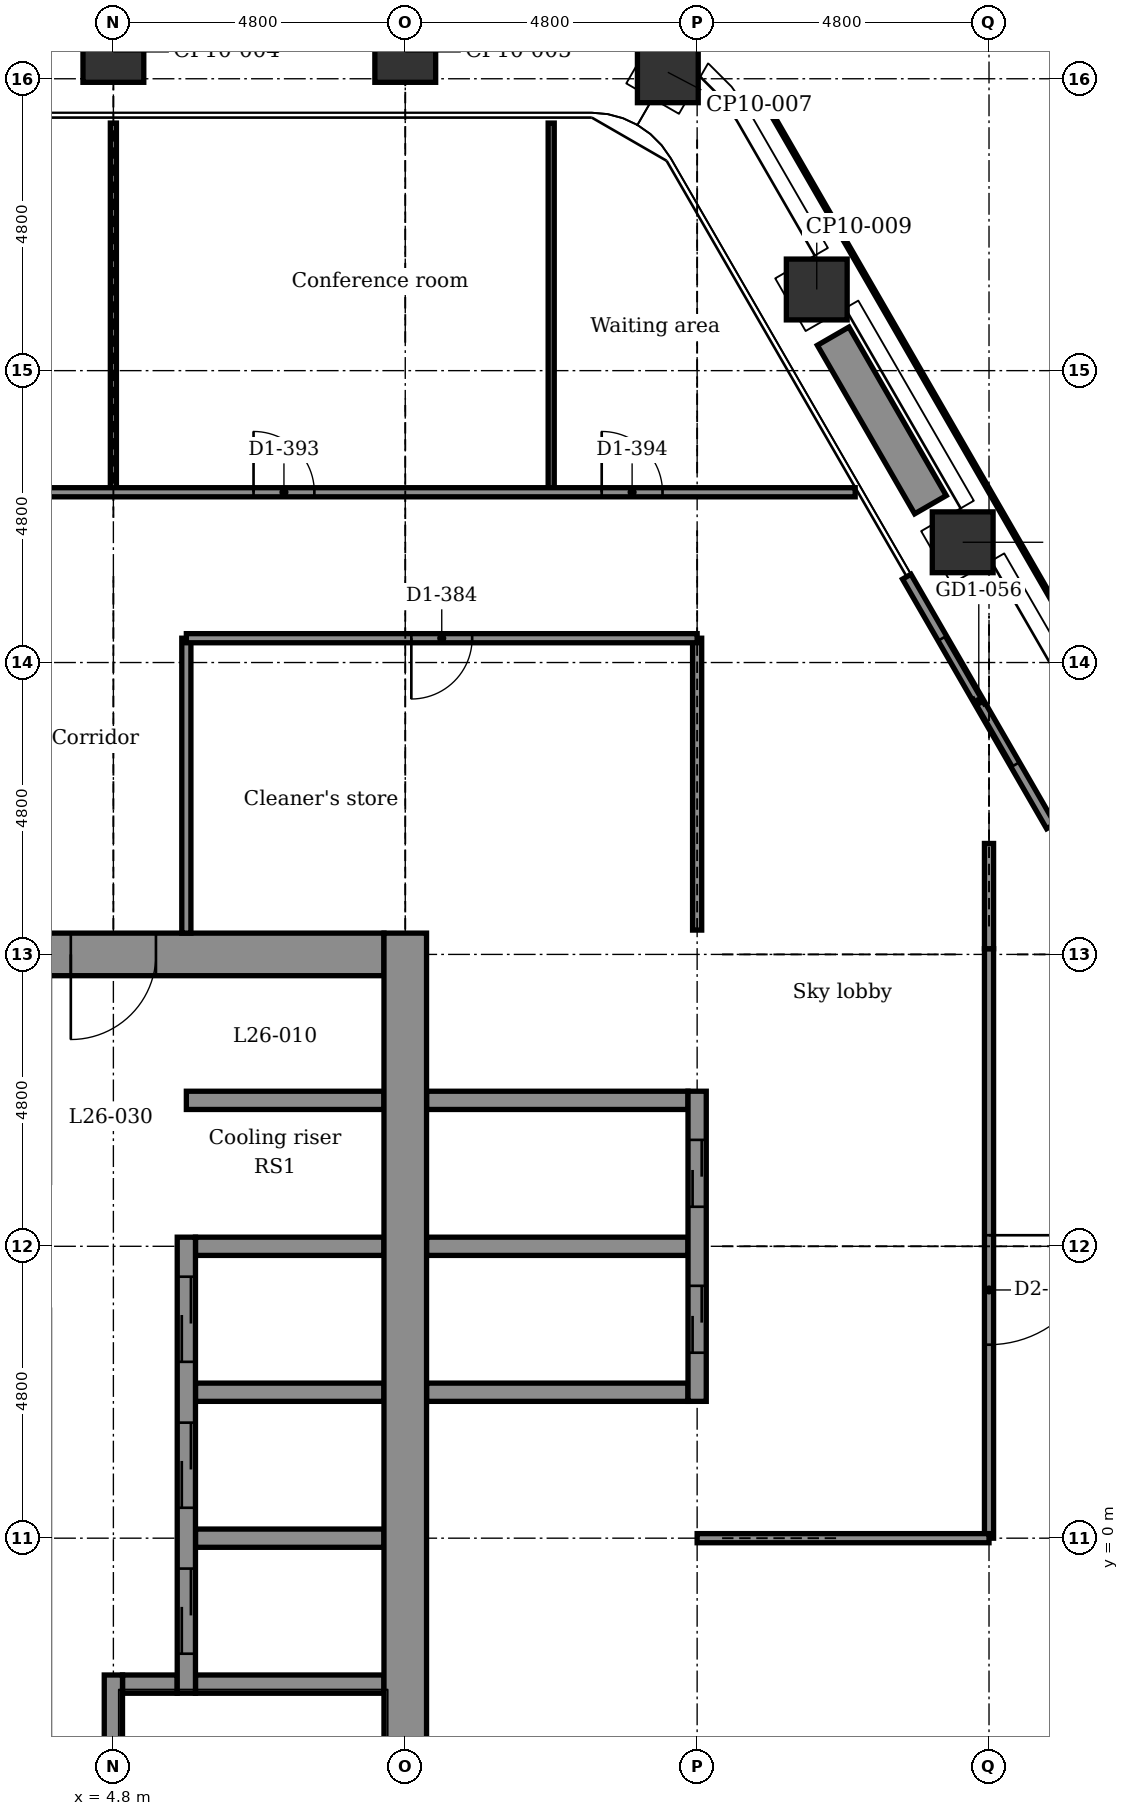
"""IFC4 building model, lengths in metres.
Left out: names, types, materials, properties, quantities, classifications, styles, units other than length and angle.
Written with IfcOpenShell. Run it as: python <this file> out.ifc"""

import sys

from ifc_helpers import new_model, si_unit, direction, frame, frame_2d, origin, origin_2d, place, context, subcontext, project, spatial, rectangle, extrude, element, fill, save


model = new_model("IFC4")
c1 = context("Model", 3, precision=1e-05, world=origin(), true_north=direction((0.0, 1.0)))
c2 = subcontext(c1, "Body", "Model", "MODEL_VIEW")
j1 = project(units=[si_unit("LENGTHUNIT", "METRE"), si_unit("PLANEANGLEUNIT", "RADIAN")], contexts=[c1])
p1 = place(None, origin())
s1 = spatial("IfcSite", under=j1, at=p1, CompositionType="ELEMENT")
p2 = place(p1, origin())
s2 = spatial("IfcBuilding", under=s1, at=p2, CompositionType="ELEMENT")
p3 = place(p2, frame((0.0, 0.0, 133.4)))
s3 = spatial("IfcBuildingStorey", under=s2, at=p3, CompositionType="ELEMENT", Elevation=133.4)
for number, where, z_axis, x_axis in (
    (1, (4.8, 24.442, -0.15), (0.0, 0.0, 1.0), (1.0, 0.0, 0.0)),
    (2, (9.6, 24.442, -0.15), (0.0, 0.0, 1.0), (1.0, 0.0, 0.0)),
    (3, (13.918, 24.107, -0.15), (0.0, 0.0, 1.0), (0.5, 0.866, 0.0)),
    (4, (16.367, 20.535, -0.15), (0.0, 0.0, 1.0), (0.866, 0.5, 0.0)),
    (5, (18.767, 16.378, -0.15), (0.0, 0.0, 1.0), (0.866, 0.5, 0.0)),
):
    element("IfcColumn", number, at=place(p3, frame(where, z_axis=z_axis, x_axis=x_axis)), inside=s3, PredefinedType="COLUMN", context=c2, shape_type="SweptSolid", body=[
        extrude(rectangle(XDim=1.0, YDim=1.0, at=origin_2d()), origin(), (0.0, 0.0, 1.0), 5.4),
    ])
p4 = place(p3, frame((4.95, -2.4, -0.15), z_axis=(0.0, 0.0, 1.0), x_axis=(1.0, 0.0, 0.0)))
e6 = element("IfcWall", 6, at=p4, inside=s3, PredefinedType="STANDARD", context=c2, shape_type="SweptSolid", body=[
    extrude(rectangle(XDim=0.9, YDim=0.3, at=frame_2d((0.45, 0.0))), origin(), (0.0, 0.0, 1.0), 5.4),
])
for number, where, z_axis, x_axis in (
    (7, (6.15, -2.4, -0.15), (0.0, 0.0, 1.0), (1.0, 0.0, 0.0)),
    (8, (6.15, 0.0, -0.15), (0.0, 0.0, 1.0), (1.0, 0.0, 0.0)),
    (9, (6.15, 2.4, -0.15), (0.0, 0.0, 1.0), (1.0, 0.0, 0.0)),
):
    element("IfcWall", number, at=place(p3, frame(where, z_axis=z_axis, x_axis=x_axis)), inside=s3, PredefinedType="STANDARD", context=c2, shape_type="SweptSolid", body=[
        extrude(rectangle(XDim=3.1, YDim=0.3, at=frame_2d((1.55, 0.0))), origin(), (0.0, 0.0, 1.0), 5.4),
    ])
p5 = place(p3, frame((9.95, 2.4, -0.15), z_axis=(0.0, 0.0, 1.0), x_axis=(1.0, 0.0, 0.0)))
e10 = element("IfcWall", 10, at=p5, inside=s3, PredefinedType="STANDARD", context=c2, shape_type="SweptSolid", body=[
    extrude(rectangle(XDim=4.3, YDim=0.3, at=frame_2d((2.15, 0.0))), origin(), (0.0, 0.0, 1.0), 4.55),
])
p6 = place(p3, frame((6.15, 4.8, -0.15), z_axis=(0.0, 0.0, 1.0), x_axis=(1.0, 0.0, 0.0)))
e11 = element("IfcWall", 11, at=p6, inside=s3, PredefinedType="STANDARD", context=c2, shape_type="SweptSolid", body=[
    extrude(rectangle(XDim=3.1, YDim=0.3, at=frame_2d((1.55, 0.0))), origin(), (0.0, 0.0, 1.0), 5.4),
])
p7 = place(p3, frame((9.95, 4.8, -0.15), z_axis=(0.0, 0.0, 1.0), x_axis=(1.0, 0.0, 0.0)))
e12 = element("IfcWall", 12, at=p7, inside=s3, PredefinedType="STANDARD", context=c2, shape_type="SweptSolid", body=[
    extrude(rectangle(XDim=4.3, YDim=0.3, at=frame_2d((2.15, 0.0))), origin(), (0.0, 0.0, 1.0), 4.55),
])
p8 = place(p3, frame((6.0, 7.2, -0.15), z_axis=(0.0, 0.0, 1.0), x_axis=(1.0, 0.0, 0.0)))
e13 = element("IfcWall", 13, at=p8, inside=s3, PredefinedType="STANDARD", context=c2, shape_type="SweptSolid", body=[
    extrude(rectangle(XDim=3.25, YDim=0.3, at=frame_2d((1.625, 0.0))), origin(), (0.0, 0.0, 1.0), 5.4),
])
p9 = place(p3, frame((9.95, 7.2, -0.15), z_axis=(0.0, 0.0, 1.0), x_axis=(1.0, 0.0, 0.0)))
e14 = element("IfcWall", 14, at=p9, inside=s3, PredefinedType="STANDARD", context=c2, shape_type="SweptSolid", body=[
    extrude(rectangle(XDim=4.3, YDim=0.3, at=frame_2d((2.15, 0.0))), origin(), (0.0, 0.0, 1.0), 4.55),
])
p10 = place(p3, frame((-5.25, 9.6, -0.15), z_axis=(0.0, 0.0, 1.0), x_axis=(1.0, 0.0, 0.0)))
e15 = element("IfcWall", 15, at=p10, inside=s3, PredefinedType="SHEAR", context=c2, shape_type="SweptSolid", body=[
    extrude(rectangle(XDim=14.5, YDim=0.7, at=frame_2d((7.25, 0.0))), origin(), (0.0, 0.0, 1.0), 5.4),
])
p11 = place(p10, frame((9.35, 0.0, 0.15)))
e16 = element("IfcOpeningElement", 16, at=p11, cuts=e15, PredefinedType="OPENING", context=c2, shape_type="SweptSolid", body=[
    extrude(rectangle(XDim=1.4, YDim=2.1, at=frame_2d((0.7, 1.05))), frame((0.0, 0.36, 0.0), z_axis=(0.0, -1.0, 0.0), x_axis=(1.0, 0.0, 0.0)), (0.0, 0.0, 1.0), 0.72),
])
p12 = place(p3, frame((4.8, -9.25, -0.15), z_axis=(0.0, 0.0, 1.0), x_axis=(0.0, 1.0, 0.0)))
e17 = element("IfcWall", 17, at=p12, inside=s3, PredefinedType="STANDARD", context=c2, shape_type="SweptSolid", body=[
    extrude(rectangle(XDim=7.0, YDim=0.3, at=frame_2d((3.5, 0.0))), origin(), (0.0, 0.0, 1.0), 5.4),
])
p13 = place(p12, frame((3.8, 0.0, 0.15)))
e18 = element("IfcOpeningElement", 18, at=p13, cuts=e17, PredefinedType="OPENING", context=c2, shape_type="SweptSolid", body=[
    extrude(rectangle(XDim=1.2, YDim=2.1, at=frame_2d((0.6, 1.05))), frame((0.0, 0.16, 0.0), z_axis=(0.0, -1.0, 0.0), x_axis=(1.0, 0.0, 0.0)), (0.0, 0.0, 1.0), 0.32),
])
p14 = place(p3, frame((6.0, -2.55, -0.15), z_axis=(0.0, 0.0, 1.0), x_axis=(0.0, 1.0, 0.0)))
e19 = element("IfcWall", 19, at=p14, inside=s3, PredefinedType="STANDARD", context=c2, shape_type="SweptSolid", body=[
    extrude(rectangle(XDim=7.5, YDim=0.3, at=frame_2d((3.75, 0.0))), origin(), (0.0, 0.0, 1.0), 5.4),
])
p15 = place(p14, frame((0.65, 0.0, 0.15)))
e20 = element("IfcOpeningElement", 20, at=p15, cuts=e19, PredefinedType="OPENING", context=c2, shape_type="SweptSolid", body=[
    extrude(rectangle(XDim=1.4, YDim=2.1, at=frame_2d((0.7, 1.05))), frame((0.0, 0.16, 0.0), z_axis=(0.0, -1.0, 0.0), x_axis=(1.0, 0.0, 0.0)), (0.0, 0.0, 1.0), 0.32),
])
p16 = place(p14, frame((3.05, 0.0, 0.15)))
e21 = element("IfcOpeningElement", 21, at=p16, cuts=e19, PredefinedType="OPENING", context=c2, shape_type="SweptSolid", body=[
    extrude(rectangle(XDim=1.4, YDim=2.1, at=frame_2d((0.7, 1.05))), frame((0.0, 0.16, 0.0), z_axis=(0.0, -1.0, 0.0), x_axis=(1.0, 0.0, 0.0)), (0.0, 0.0, 1.0), 0.32),
])
p17 = place(p14, frame((5.45, 0.0, 0.15)))
e22 = element("IfcOpeningElement", 22, at=p17, cuts=e19, PredefinedType="OPENING", context=c2, shape_type="SweptSolid", body=[
    extrude(rectangle(XDim=1.4, YDim=2.1, at=frame_2d((0.7, 1.05))), frame((0.0, 0.16, 0.0), z_axis=(0.0, -1.0, 0.0), x_axis=(1.0, 0.0, 0.0)), (0.0, 0.0, 1.0), 0.32),
])
p18 = place(p3, frame((9.6, -10.15, -0.15), z_axis=(0.0, 0.0, 1.0), x_axis=(0.0, 1.0, 0.0)))
e23 = element("IfcWall", 23, at=p18, inside=s3, PredefinedType="SHEAR", context=c2, shape_type="SweptSolid", body=[
    extrude(rectangle(XDim=20.1, YDim=0.7, at=frame_2d((10.05, 0.0))), origin(), (0.0, 0.0, 1.0), 5.4),
])
p19 = place(p3, frame((14.4, 2.25, -0.15), z_axis=(0.0, 0.0, 1.0), x_axis=(0.0, 1.0, 0.0)))
e24 = element("IfcWall", 24, at=p19, inside=s3, PredefinedType="STANDARD", context=c2, shape_type="SweptSolid", body=[
    extrude(rectangle(XDim=5.1, YDim=0.3, at=frame_2d((2.55, 0.0))), origin(), (0.0, 0.0, 1.0), 4.55),
])
p20 = place(p19, frame((0.8, 0.0, 0.15)))
e25 = element("IfcOpeningElement", 25, at=p20, cuts=e24, PredefinedType="OPENING", context=c2, shape_type="SweptSolid", body=[
    extrude(rectangle(XDim=1.1, YDim=2.1, at=frame_2d((0.55, 1.05))), frame((0.0, 0.16, 0.0), z_axis=(0.0, -1.0, 0.0), x_axis=(1.0, 0.0, 0.0)), (0.0, 0.0, 1.0), 0.32),
])
p21 = place(p19, frame((3.2, 0.0, 0.15)))
e26 = element("IfcOpeningElement", 26, at=p21, cuts=e24, PredefinedType="OPENING", context=c2, shape_type="SweptSolid", body=[
    extrude(rectangle(XDim=1.1, YDim=2.1, at=frame_2d((0.55, 1.05))), frame((0.0, 0.16, 0.0), z_axis=(0.0, -1.0, 0.0), x_axis=(1.0, 0.0, 0.0)), (0.0, 0.0, 1.0), 0.32),
])
p22 = place(p3, frame((17.847, 15.812, 0.0), z_axis=(0.0, 0.0, 1.0), x_axis=(0.5000167099, -0.866015756104, 0.0)))
e27 = element("IfcWall", 27, at=p22, inside=s3, PredefinedType="PARTITIONING", context=c2, shape_type="SweptSolid", body=[
    extrude(rectangle(XDim=4.74, YDim=0.16, at=frame_2d((2.37, 0.0))), origin(), (0.0, 0.0, 1.0), 5.25),
])
p23 = place(p22, frame((1.17, 0.0, 0.0)))
e28 = element("IfcOpeningElement", 28, at=p23, cuts=e27, PredefinedType="OPENING", context=c2, shape_type="SweptSolid", body=[
    extrude(rectangle(XDim=2.4, YDim=2.4, at=frame_2d((1.2, 1.2))), frame((0.0, 0.09, 0.0), z_axis=(0.0, -1.0, 0.0), x_axis=(1.0, 0.0, 0.0)), (0.0, 0.0, 1.0), 0.18),
])
p24 = place(p3, frame((16.637, 19.767, 0.0), z_axis=(0.0, 0.0, 1.0), x_axis=(0.500028443584, -0.866008981251, 0.0)))
e29 = element("IfcWall", 29, at=p24, inside=s3, PredefinedType="USERDEFINED", context=c2, shape_type="SweptSolid", body=[
    extrude(rectangle(XDim=3.2, YDim=0.6, at=frame_2d((1.6, 0.0))), origin(), (0.0, 0.0, 1.0), 0.7),
])
p25 = place(p3, frame((19.2, 0.0, 0.0), z_axis=(0.0, 0.0, 1.0), x_axis=(0.0, 1.0, 0.0)))
e30 = element("IfcWall", 30, at=p25, inside=s3, PredefinedType="PARTITIONING", context=c2, shape_type="SweptSolid", body=[
    extrude(rectangle(XDim=9.694, YDim=0.15, at=frame_2d((4.847, 0.0))), origin(), (0.0, 0.0, 1.0), 5.25),
])
p26 = place(p25, frame((3.182, 0.0, 0.0)))
e31 = element("IfcOpeningElement", 31, at=p26, cuts=e30, PredefinedType="OPENING", context=c2, shape_type="SweptSolid", body=[
    extrude(rectangle(XDim=1.8, YDim=2.1, at=frame_2d((0.9, 1.05))), frame((0.0, 0.085, 0.0), z_axis=(0.0, -1.0, 0.0), x_axis=(1.0, 0.0, 0.0)), (0.0, 0.0, 1.0), 0.17),
])
p27 = place(p3, frame((19.2, 9.694, 0.0), z_axis=(0.0, 0.0, 1.0), x_axis=(0.0, 1.0, 0.0)))
e32 = element("IfcWall", 32, at=p27, inside=s3, PredefinedType="PARTITIONING", context=c2, shape_type="SweptSolid", body=[
    extrude(rectangle(XDim=1.731, YDim=0.15, at=frame_2d((0.865, 0.0))), origin(), (0.0, 0.0, 1.0), 4.94),
])
p28 = place(p3, frame((14.4, 10.0, 0.0), z_axis=(0.0, 0.0, 1.0), x_axis=(0.0, 1.0, 0.0)))
e33 = element("IfcWall", 33, at=p28, inside=s3, PredefinedType="PARTITIONING", context=c2, shape_type="SweptSolid", body=[
    extrude(rectangle(XDim=4.8, YDim=0.15, at=frame_2d((2.4, 0.0))), origin(), (0.0, 0.0, 1.0), 4.566),
])
p29 = place(p3, frame((12.0, 17.2, 0.0), z_axis=(0.0, 0.0, 1.0), x_axis=(0.0, 1.0, 0.0)))
e34 = element("IfcWall", 34, at=p29, inside=s3, PredefinedType="PARTITIONING", context=c2, shape_type="SweptSolid", body=[
    extrude(rectangle(XDim=6.072, YDim=0.1, at=frame_2d((3.036, 0.0))), origin(), (0.0, 0.0, 1.0), 5.25),
])
p30 = place(p3, frame((6.0, 9.95, 0.0), z_axis=(0.0, 0.0, 1.0), x_axis=(0.0, 1.0, 0.0)))
e35 = element("IfcWall", 35, at=p30, inside=s3, PredefinedType="PARTITIONING", context=c2, shape_type="SweptSolid", body=[
    extrude(rectangle(XDim=4.85, YDim=0.15, at=frame_2d((2.425, 0.0))), origin(), (0.0, 0.0, 1.0), 5.25),
])
p31 = place(p3, frame((4.8, 17.2, 0.0), z_axis=(0.0, 0.0, 1.0), x_axis=(0.0, 1.0, 0.0)))
e36 = element("IfcWall", 36, at=p31, inside=s3, PredefinedType="PARTITIONING", context=c2, shape_type="SweptSolid", body=[
    extrude(rectangle(XDim=6.072, YDim=0.1, at=frame_2d((3.036, 0.0))), origin(), (0.0, 0.0, 1.0), 4.566),
])
p32 = place(p3, frame((14.4, 0.0, 0.0), z_axis=(0.0, 0.0, 1.0), x_axis=(1.0, 0.0, 0.0)))
e37 = element("IfcWall", 37, at=p32, inside=s3, PredefinedType="PARTITIONING", context=c2, shape_type="SweptSolid", body=[
    extrude(rectangle(XDim=4.8, YDim=0.15, at=frame_2d((2.4, 0.0))), origin(), (0.0, 0.0, 1.0), 4.41),
])
p33 = place(p3, frame((6.0, 14.8, 0.0), z_axis=(0.0, 0.0, 1.0), x_axis=(1.0, 0.0, 0.0)))
e38 = element("IfcWall", 38, at=p33, inside=s3, PredefinedType="PARTITIONING", context=c2, shape_type="SweptSolid", body=[
    extrude(rectangle(XDim=8.4, YDim=0.15, at=frame_2d((4.2, 0.0))), origin(), (0.0, 0.0, 1.0), 5.25),
])
p34 = place(p33, frame((3.7, 0.0, 0.0)))
e39 = element("IfcOpeningElement", 39, at=p34, cuts=e38, PredefinedType="OPENING", context=c2, shape_type="SweptSolid", body=[
    extrude(rectangle(XDim=1.0, YDim=2.1, at=frame_2d((0.5, 1.05))), frame((0.0, 0.085, 0.0), z_axis=(0.0, -1.0, 0.0), x_axis=(1.0, 0.0, 0.0)), (0.0, 0.0, 1.0), 0.17),
])
p35 = place(p3, frame((-16.999, 17.2, 0.0), z_axis=(0.0, 0.0, 1.0), x_axis=(1.0, 0.0, 0.0)))
e40 = element("IfcWall", 40, at=p35, inside=s3, PredefinedType="PARTITIONING", context=c2, shape_type="SweptSolid", body=[
    extrude(rectangle(XDim=33.998, YDim=0.15, at=frame_2d((16.999, 0.0))), origin(), (0.0, 0.0, 1.0), 5.25),
])
p36 = place(p35, frame((8.14, 0.0, 0.0)))
e41 = element("IfcOpeningElement", 41, at=p36, cuts=e40, PredefinedType="OPENING", context=c2, shape_type="SweptSolid", body=[
    extrude(rectangle(XDim=1.0, YDim=2.1, at=frame_2d((0.5, 1.05))), frame((0.0, 0.085, 0.0), z_axis=(0.0, -1.0, 0.0), x_axis=(1.0, 0.0, 0.0)), (0.0, 0.0, 1.0), 0.17),
])
p37 = place(p35, frame((14.574, 0.0, 0.0)))
e42 = element("IfcOpeningElement", 42, at=p37, cuts=e40, PredefinedType="OPENING", context=c2, shape_type="SweptSolid", body=[
    extrude(rectangle(XDim=1.0, YDim=2.1, at=frame_2d((0.5, 1.05))), frame((0.0, 0.085, 0.0), z_axis=(0.0, -1.0, 0.0), x_axis=(1.0, 0.0, 0.0)), (0.0, 0.0, 1.0), 0.17),
])
p38 = place(p35, frame((24.104, 0.0, 0.0)))
e43 = element("IfcOpeningElement", 43, at=p38, cuts=e40, PredefinedType="OPENING", context=c2, shape_type="SweptSolid", body=[
    extrude(rectangle(XDim=1.0, YDim=2.1, at=frame_2d((0.5, 1.05))), frame((0.0, 0.085, 0.0), z_axis=(0.0, -1.0, 0.0), x_axis=(1.0, 0.0, 0.0)), (0.0, 0.0, 1.0), 0.17),
])
p39 = place(p35, frame((29.83, 0.0, 0.0)))
e44 = element("IfcOpeningElement", 44, at=p39, cuts=e40, PredefinedType="OPENING", context=c2, shape_type="SweptSolid", body=[
    extrude(rectangle(XDim=1.0, YDim=2.1, at=frame_2d((0.5, 1.05))), frame((0.0, 0.085, 0.0), z_axis=(0.0, -1.0, 0.0), x_axis=(1.0, 0.0, 0.0)), (0.0, 0.0, 1.0), 0.17),
])
p40 = place(p23, origin())
e45 = element("IfcDoor", 45, at=p40, inside=s3, OperationType="DOUBLE_DOOR_SLIDING", PredefinedType="DOOR", context=c2, shape_type="SweptSolid", body=[
    extrude(rectangle(XDim=2.4, YDim=2.4, at=frame_2d((1.2, 1.2))), frame((0.0, 0.025, 0.0), z_axis=(0.0, -1.0, 0.0), x_axis=(1.0, 0.0, 0.0)), (0.0, 0.0, 1.0), 0.05),
])
fill(e28, e45)
p41 = place(p34, frame((1.0, 0.0, 0.0), z_axis=(0.0, 0.0, 1.0), x_axis=(-1.0, 0.0, 0.0)))
e46 = element("IfcDoor", 46, at=p41, inside=s3, OperationType="SINGLE_SWING_LEFT", PredefinedType="DOOR", context=c2, shape_type="SweptSolid", body=[
    extrude(rectangle(XDim=1.0, YDim=2.1, at=frame_2d((0.5, 1.05))), frame((0.0, 0.025, 0.0), z_axis=(0.0, -1.0, 0.0), x_axis=(1.0, 0.0, 0.0)), (0.0, 0.0, 1.0), 0.05),
])
fill(e39, e46)
p42 = place(p38, origin())
e47 = element("IfcDoor", 47, at=p42, inside=s3, OperationType="SINGLE_SWING_LEFT", PredefinedType="DOOR", context=c2, shape_type="SweptSolid", body=[
    extrude(rectangle(XDim=1.0, YDim=2.1, at=frame_2d((0.5, 1.05))), frame((0.0, 0.025, 0.0), z_axis=(0.0, -1.0, 0.0), x_axis=(1.0, 0.0, 0.0)), (0.0, 0.0, 1.0), 0.05),
])
fill(e43, e47)
p43 = place(p39, origin())
e48 = element("IfcDoor", 48, at=p43, inside=s3, OperationType="SINGLE_SWING_LEFT", PredefinedType="DOOR", context=c2, shape_type="SweptSolid", body=[
    extrude(rectangle(XDim=1.0, YDim=2.1, at=frame_2d((0.5, 1.05))), frame((0.0, 0.025, 0.0), z_axis=(0.0, -1.0, 0.0), x_axis=(1.0, 0.0, 0.0)), (0.0, 0.0, 1.0), 0.05),
])
fill(e44, e48)
p44 = place(p26, frame((1.8, 0.0, 0.0), z_axis=(0.0, 0.0, 1.0), x_axis=(-1.0, 0.0, 0.0)))
e49 = element("IfcDoor", 49, at=p44, inside=s3, OperationType="SINGLE_SWING_RIGHT", PredefinedType="DOOR", context=c2, shape_type="SweptSolid", body=[
    extrude(rectangle(XDim=1.8, YDim=2.1, at=frame_2d((0.9, 1.05))), frame((0.0, 0.025, 0.0), z_axis=(0.0, -1.0, 0.0), x_axis=(1.0, 0.0, 0.0)), (0.0, 0.0, 1.0), 0.05),
])
fill(e31, e49)
p45 = place(p15, origin())
e50 = element("IfcDoor", 50, at=p45, inside=s3, OperationType="DOUBLE_DOOR_SLIDING", PredefinedType="DOOR", context=c2, shape_type="SweptSolid", body=[
    extrude(rectangle(XDim=1.4, YDim=2.1, at=frame_2d((0.7, 1.05))), frame((0.0, 0.025, 0.0), z_axis=(0.0, -1.0, 0.0), x_axis=(1.0, 0.0, 0.0)), (0.0, 0.0, 1.0), 0.05),
])
fill(e20, e50)
p46 = place(p16, origin())
e51 = element("IfcDoor", 51, at=p46, inside=s3, OperationType="DOUBLE_DOOR_SLIDING", PredefinedType="DOOR", context=c2, shape_type="SweptSolid", body=[
    extrude(rectangle(XDim=1.4, YDim=2.1, at=frame_2d((0.7, 1.05))), frame((0.0, 0.025, 0.0), z_axis=(0.0, -1.0, 0.0), x_axis=(1.0, 0.0, 0.0)), (0.0, 0.0, 1.0), 0.05),
])
fill(e21, e51)
p47 = place(p17, origin())
e52 = element("IfcDoor", 52, at=p47, inside=s3, OperationType="DOUBLE_DOOR_SLIDING", PredefinedType="DOOR", context=c2, shape_type="SweptSolid", body=[
    extrude(rectangle(XDim=1.4, YDim=2.1, at=frame_2d((0.7, 1.05))), frame((0.0, 0.025, 0.0), z_axis=(0.0, -1.0, 0.0), x_axis=(1.0, 0.0, 0.0)), (0.0, 0.0, 1.0), 0.05),
])
fill(e22, e52)
p48 = place(p20, origin())
e53 = element("IfcDoor", 53, at=p48, inside=s3, OperationType="DOUBLE_DOOR_SLIDING", PredefinedType="DOOR", context=c2, shape_type="SweptSolid", body=[
    extrude(rectangle(XDim=1.1, YDim=2.1, at=frame_2d((0.55, 1.05))), frame((0.0, 0.025, 0.0), z_axis=(0.0, -1.0, 0.0), x_axis=(1.0, 0.0, 0.0)), (0.0, 0.0, 1.0), 0.05),
])
fill(e25, e53)
p49 = place(p21, origin())
e54 = element("IfcDoor", 54, at=p49, inside=s3, OperationType="DOUBLE_DOOR_SLIDING", PredefinedType="DOOR", context=c2, shape_type="SweptSolid", body=[
    extrude(rectangle(XDim=1.1, YDim=2.1, at=frame_2d((0.55, 1.05))), frame((0.0, 0.025, 0.0), z_axis=(0.0, -1.0, 0.0), x_axis=(1.0, 0.0, 0.0)), (0.0, 0.0, 1.0), 0.05),
])
fill(e26, e54)
p50 = place(p11, frame((1.4, 0.0, 0.0), z_axis=(0.0, 0.0, 1.0), x_axis=(-1.0, 0.0, 0.0)))
e55 = element("IfcDoor", 55, at=p50, inside=s3, OperationType="SINGLE_SWING_LEFT", PredefinedType="DOOR", context=c2, shape_type="SweptSolid", body=[
    extrude(rectangle(XDim=1.4, YDim=2.1, at=frame_2d((0.7, 1.05))), frame((0.0, 0.025, 0.0), z_axis=(0.0, -1.0, 0.0), x_axis=(1.0, 0.0, 0.0)), (0.0, 0.0, 1.0), 0.05),
])
fill(e16, e55)
save(model, sys.argv[1])
